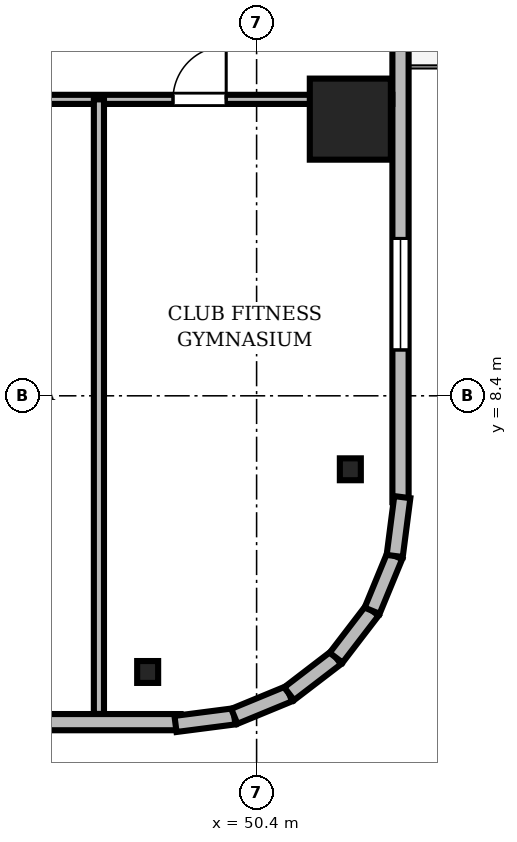
"""IFC4 building model, lengths in metres.
Left out: names, types, materials, properties, quantities, classifications, styles, units other than length and angle.
Written with IfcOpenShell. Run it as: python <this file> out.ifc"""

import sys

from ifc_helpers import new_model, si_unit, direction, frame, frame_2d, origin, origin_2d, place, context, subcontext, project, spatial, rectangle, i_section, extrude, source, transform, mapped, element, fill, save


model = new_model("IFC4")
c1 = context("Model", 3, precision=1e-05, world=origin(), true_north=direction((0.0, 1.0)))
c2 = subcontext(c1, "Body", "Model", "MODEL_VIEW")
j1 = project(units=[si_unit("LENGTHUNIT", "METRE"), si_unit("PLANEANGLEUNIT", "RADIAN")], contexts=[c1])
p1 = place(None, origin())
s1 = spatial("IfcSite", under=j1, at=p1, CompositionType="ELEMENT")
p2 = place(p1, origin())
s2 = spatial("IfcBuilding", under=s1, at=p2, CompositionType="ELEMENT")
p3 = place(p2, frame((0.0, 0.0, 129.8)))
s3 = spatial("IfcBuildingStorey", under=s2, at=p3, CompositionType="ELEMENT", Elevation=129.8)
m1 = source(origin(), c2, "Body", "SweptSolid", [
    extrude(rectangle(XDim=1.6, YDim=1.6, at=origin_2d()), origin(), (0.0, 0.0, 1.0), 3.46),
])
p4 = place(p3, frame((52.25, 13.86, 0.0), z_axis=(0.0, 0.0, 1.0), x_axis=(1.0, 0.0, 0.0)))
e1 = element("IfcColumn", 1, at=p4, inside=s3, PredefinedType="COLUMN", context=c2, shape_type="MappedRepresentation", body=[
    mapped(m1, transform((0.0, 0.0, 0.0), scale=1.0)),
])
m2 = source(origin(), c2, "Body", "SweptSolid", [
    extrude(i_section(OverallWidth=0.414, OverallDepth=0.432, WebThickness=0.026, FlangeThickness=0.04, FilletRadius=0.015, at=origin_2d()), origin(), (0.0, 0.0, 1.0), 3.46),
])
for number, where, z_axis, x_axis in (
    (2, (48.25, 2.95, 0.0), (0.0, 0.0, 1.0), (1.0, 0.0, 0.0)),
    (3, (52.25, 6.95, 0.0), (0.0, 0.0, 1.0), (1.0, 0.0, 0.0)),
):
    element("IfcColumn", number, at=place(p3, frame(where, z_axis=z_axis, x_axis=x_axis)), inside=s3, PredefinedType="COLUMN", context=c2, shape_type="MappedRepresentation", body=[
        mapped(m2, transform((0.0, 0.0, 0.0), scale=1.0)),
    ])
m3 = source(origin(), c2, "Body", "SweptSolid", [
    extrude(rectangle(XDim=15.6, YDim=0.32, at=frame_2d((7.8, 0.0))), origin(), (0.0, 0.0, 1.0), 3.46),
])
p5 = place(p3, frame((33.3, 1.96, 0.0), z_axis=(0.0, 0.0, 1.0), x_axis=(1.0, 0.0, 0.0)))
e4 = element("IfcWall", 4, at=p5, inside=s3, PredefinedType="SOLIDWALL", context=c2, shape_type="MappedRepresentation", body=[
    mapped(m3, transform((0.0, 0.0, 0.0), scale=1.0)),
])
m4 = source(origin(), c2, "Body", "SweptSolid", [
    extrude(rectangle(XDim=1.4, YDim=2.3, at=frame_2d((0.7, 1.15))), frame((0.0, 0.17, 0.0), z_axis=(0.0, -1.0, 0.0), x_axis=(1.0, 0.0, 0.0)), (0.0, 0.0, 1.0), 0.34),
])
p6 = place(p5, frame((4.59, 0.0, 0.0)))
e5 = element("IfcOpeningElement", 5, at=p6, cuts=e4, PredefinedType="OPENING", context=c2, shape_type="MappedRepresentation", body=[
    mapped(m4, transform((0.0, 0.0, 0.0), scale=1.0)),
])
m5 = source(origin(), c2, "Body", "SweptSolid", [
    extrude(rectangle(XDim=2.2, YDim=2.4, at=frame_2d((1.1, 1.2))), frame((0.0, 0.17, 0.0), z_axis=(0.0, -1.0, 0.0), x_axis=(1.0, 0.0, 0.0)), (0.0, 0.0, 1.0), 0.34),
])
p7 = place(p5, frame((10.395, 0.0, 0.72)))
e6 = element("IfcOpeningElement", 6, at=p7, cuts=e4, PredefinedType="OPENING", context=c2, shape_type="MappedRepresentation", body=[
    mapped(m5, transform((0.0, 0.0, 0.0), scale=1.0)),
])
p8 = place(p3, frame((53.24, 6.3, 0.0), z_axis=(0.0, 0.0, 1.0), x_axis=(0.0, 1.0, 0.0)))
e7 = element("IfcWall", 7, at=p8, inside=s3, PredefinedType="SOLIDWALL", context=c2, shape_type="MappedRepresentation", body=[
    mapped(m3, transform((0.0, 0.0, 0.0), scale=1.0)),
])
p9 = place(p8, frame((9.61, 0.0, 0.0)))
e8 = element("IfcOpeningElement", 8, at=p9, cuts=e7, PredefinedType="OPENING", context=c2, shape_type="MappedRepresentation", body=[
    mapped(m4, transform((0.0, 0.0, 0.0), scale=1.0)),
])
p10 = place(p8, frame((3.005, 0.0, 0.72)))
e9 = element("IfcOpeningElement", 9, at=p10, cuts=e7, PredefinedType="OPENING", context=c2, shape_type="MappedRepresentation", body=[
    mapped(m5, transform((0.0, 0.0, 0.0), scale=1.0)),
])
m6 = source(origin(), c2, "Body", "SweptSolid", [
    extrude(rectangle(XDim=1.17, YDim=0.32, at=frame_2d((0.585, 0.0))), origin(), (0.0, 0.0, 1.0), 3.46),
])
p11 = place(p3, frame((48.8, 1.925, 0.0), z_axis=(0.0, 0.0, 1.0), x_axis=(0.991762485493, 0.128090485085, 0.0)))
e10 = element("IfcWall", 10, at=p11, inside=s3, PredefinedType="SOLIDWALL", context=c2, shape_type="MappedRepresentation", body=[
    mapped(m6, transform((0.0, 0.0, 0.0), scale=1.0)),
])
m7 = source(origin(), c2, "Body", "SweptSolid", [
    extrude(rectangle(XDim=1.169, YDim=0.32, at=frame_2d((0.585, 0.0))), origin(), (0.0, 0.0, 1.0), 3.46),
])
p12 = place(p3, frame((49.96, 2.074, 0.0), z_axis=(0.0, 0.0, 1.0), x_axis=(0.924479075121, 0.381232789334, 0.0)))
e11 = element("IfcWall", 11, at=p12, inside=s3, PredefinedType="SOLIDWALL", context=c2, shape_type="MappedRepresentation", body=[
    mapped(m7, transform((0.0, 0.0, 0.0), scale=1.0)),
])
m8 = source(origin(), c2, "Body", "SweptSolid", [
    extrude(rectangle(XDim=1.169, YDim=0.32, at=frame_2d((0.584, 0.0))), origin(), (0.0, 0.0, 1.0), 3.46),
])
p13 = place(p3, frame((51.041, 2.52, 0.0), z_axis=(0.0, 0.0, 1.0), x_axis=(0.793663520347, 0.608356981114, 0.0)))
e12 = element("IfcWall", 12, at=p13, inside=s3, PredefinedType="SOLIDWALL", context=c2, shape_type="MappedRepresentation", body=[
    mapped(m8, transform((0.0, 0.0, 0.0), scale=1.0)),
])
m9 = source(origin(), c2, "Body", "SweptSolid", [
    extrude(rectangle(XDim=1.169, YDim=0.32, at=frame_2d((0.584, 0.0))), origin(), (0.0, 0.0, 1.0), 3.46),
])
for number, where, z_axis, x_axis in (
    (13, (51.969, 3.231, 0.0), (0.0, 0.0, 1.0), (0.608, 0.794, 0.0)),
    (14, (52.68, 4.159, 0.0), (0.0, 0.0, 1.0), (0.381, 0.925, 0.0)),
):
    element("IfcWall", number, at=place(p3, frame(where, z_axis=z_axis, x_axis=x_axis)), inside=s3, PredefinedType="SOLIDWALL", context=c2, shape_type="MappedRepresentation", body=[
        mapped(m9, transform((0.0, 0.0, 0.0), scale=1.0)),
    ])
m10 = source(origin(), c2, "Body", "SweptSolid", [
    extrude(rectangle(XDim=1.171, YDim=0.32, at=frame_2d((0.585, 0.0))), origin(), (0.0, 0.0, 1.0), 3.46),
])
p14 = place(p3, frame((53.125, 5.24, 0.0), z_axis=(0.0, 0.0, 1.0), x_axis=(0.128269133229, 0.991739395941, 0.0)))
e15 = element("IfcWall", 15, at=p14, inside=s3, PredefinedType="SOLIDWALL", context=c2, shape_type="MappedRepresentation", body=[
    mapped(m10, transform((0.0, 0.0, 0.0), scale=1.0)),
])
m11 = source(origin(), c2, "Body", "SweptSolid", [
    extrude(rectangle(XDim=46.156, YDim=0.18, at=frame_2d((23.078, 0.0))), origin(), (0.0, 0.0, 1.0), 2.702),
])
p15 = place(p3, frame((6.922, 14.25, 0.0), z_axis=(0.0, 0.0, 1.0), x_axis=(1.0, 0.0, 0.0)))
e16 = element("IfcWall", 16, at=p15, inside=s3, PredefinedType="PARTITIONING", context=c2, shape_type="MappedRepresentation", body=[
    mapped(m11, transform((0.0, 0.0, 0.0), scale=1.0)),
])
m12 = source(origin(), c2, "Body", "SweptSolid", [
    extrude(rectangle(XDim=1.05, YDim=2.2, at=frame_2d((0.525, 1.1))), frame((0.0, 0.1, 0.0), z_axis=(0.0, -1.0, 0.0), x_axis=(1.0, 0.0, 0.0)), (0.0, 0.0, 1.0), 0.2),
])
p16 = place(p15, frame((12.298, 0.0, 0.0)))
e17 = element("IfcOpeningElement", 17, at=p16, cuts=e16, PredefinedType="OPENING", context=c2, shape_type="MappedRepresentation", body=[
    mapped(m12, transform((0.0, 0.0, 0.0), scale=1.0)),
])
p17 = place(p15, frame((14.853, 0.0, 0.0)))
e18 = element("IfcOpeningElement", 18, at=p17, cuts=e16, PredefinedType="OPENING", context=c2, shape_type="MappedRepresentation", body=[
    mapped(m12, transform((0.0, 0.0, 0.0), scale=1.0)),
])
p18 = place(p15, frame((18.556, 0.0, 0.0)))
e19 = element("IfcOpeningElement", 19, at=p18, cuts=e16, PredefinedType="OPENING", context=c2, shape_type="MappedRepresentation", body=[
    mapped(m12, transform((0.0, 0.0, 0.0), scale=1.0)),
])
m13 = source(origin(), c2, "Body", "SweptSolid", [
    extrude(rectangle(XDim=0.95, YDim=2.15, at=frame_2d((0.475, 1.075))), frame((0.0, 0.1, 0.0), z_axis=(0.0, -1.0, 0.0), x_axis=(1.0, 0.0, 0.0)), (0.0, 0.0, 1.0), 0.2),
])
p19 = place(p15, frame((23.985, 0.0, 0.0)))
e20 = element("IfcOpeningElement", 20, at=p19, cuts=e16, PredefinedType="OPENING", context=c2, shape_type="MappedRepresentation", body=[
    mapped(m13, transform((0.0, 0.0, 0.0), scale=1.0)),
])
p20 = place(p15, frame((27.213, 0.0, 0.0)))
e21 = element("IfcOpeningElement", 21, at=p20, cuts=e16, PredefinedType="OPENING", context=c2, shape_type="MappedRepresentation", body=[
    mapped(m12, transform((0.0, 0.0, 0.0), scale=1.0)),
])
p21 = place(p15, frame((31.666, 0.0, 0.0)))
e22 = element("IfcOpeningElement", 22, at=p21, cuts=e16, PredefinedType="OPENING", context=c2, shape_type="MappedRepresentation", body=[
    mapped(m12, transform((0.0, 0.0, 0.0), scale=1.0)),
])
p22 = place(p15, frame((36.869, 0.0, 0.0)))
e23 = element("IfcOpeningElement", 23, at=p22, cuts=e16, PredefinedType="OPENING", context=c2, shape_type="MappedRepresentation", body=[
    mapped(m12, transform((0.0, 0.0, 0.0), scale=1.0)),
])
p23 = place(p15, frame((41.828, 0.0, 0.0)))
e24 = element("IfcOpeningElement", 24, at=p23, cuts=e16, PredefinedType="OPENING", context=c2, shape_type="MappedRepresentation", body=[
    mapped(m12, transform((0.0, 0.0, 0.0), scale=1.0)),
])
m14 = source(origin(), c2, "Body", "SweptSolid", [
    extrude(rectangle(XDim=12.128, YDim=0.2, at=frame_2d((6.064, 0.0))), origin(), (0.0, 0.0, 1.0), 2.702),
])
p24 = place(p3, frame((47.288, 2.122, 0.0), z_axis=(0.0, 0.0, 1.0), x_axis=(0.0, 1.0, 0.0)))
e25 = element("IfcWall", 25, at=p24, inside=s3, PredefinedType="PARTITIONING", context=c2, shape_type="MappedRepresentation", body=[
    mapped(m14, transform((0.0, 0.0, 0.0), scale=1.0)),
])
m15 = source(origin(), c2, "Body", "SweptSolid", [
    extrude(rectangle(XDim=2.2, YDim=2.4, at=frame_2d((1.1, 1.2))), frame((0.0, 0.03, 0.0), z_axis=(0.0, -1.0, 0.0), x_axis=(1.0, 0.0, 0.0)), (0.0, 0.0, 1.0), 0.06),
])
p25 = place(p10, origin())
e26 = element("IfcWindow", 26, at=p25, inside=s3, PartitioningType="SINGLE_PANEL", PredefinedType="WINDOW", context=c2, shape_type="MappedRepresentation", body=[
    mapped(m15, transform((0.0, 0.0, 0.0), scale=1.0)),
])
fill(e9, e26)
m16 = source(origin(), c2, "Body", "SweptSolid", [
    extrude(rectangle(XDim=1.05, YDim=2.2, at=frame_2d((0.525, 1.1))), frame((0.0, 0.025, 0.0), z_axis=(0.0, -1.0, 0.0), x_axis=(1.0, 0.0, 0.0)), (0.0, 0.0, 1.0), 0.05),
])
p26 = place(p23, origin())
e27 = element("IfcDoor", 27, at=p26, inside=s3, OperationType="SINGLE_SWING_RIGHT", PredefinedType="DOOR", context=c2, shape_type="MappedRepresentation", body=[
    mapped(m16, transform((0.0, 0.0, 0.0), scale=1.0)),
])
fill(e24, e27)
save(model, sys.argv[1])
